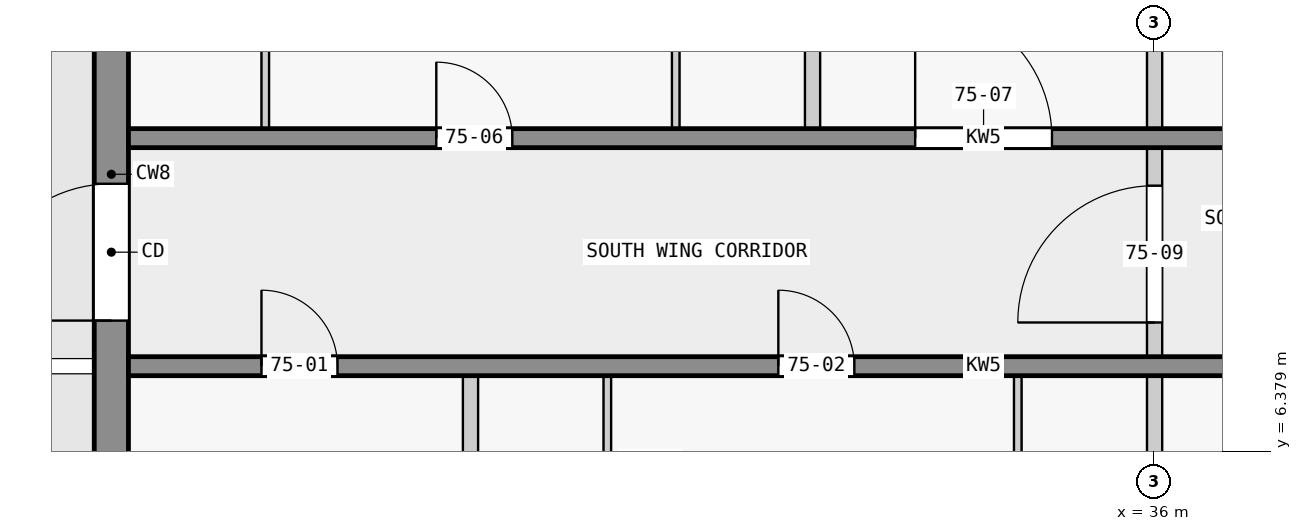
"""IFC4 building model, lengths in metres.
Left out: names, types, materials, properties, quantities, classifications, styles, units other than length and angle.
Written with IfcOpenShell. Run it as: python <this file> out.ifc"""

import sys

from ifc_helpers import new_model, si_unit, direction, frame, frame_2d, origin, place, context, subcontext, project, spatial, rectangle, extrude, element, fill, save


model = new_model("IFC4")
c1 = context("Model", 3, precision=1e-05, world=origin(), true_north=direction((0.0, 1.0)))
c2 = subcontext(c1, "Body", "Model", "MODEL_VIEW")
j1 = project(units=[si_unit("LENGTHUNIT", "METRE"), si_unit("PLANEANGLEUNIT", "RADIAN")], contexts=[c1])
p1 = place(None, origin())
s1 = spatial("IfcSite", under=j1, at=p1, CompositionType="ELEMENT")
p2 = place(p1, origin())
s2 = spatial("IfcBuilding", under=s1, at=p2, CompositionType="ELEMENT")
p3 = place(p2, frame((0.0, 0.0, 284.4)))
s3 = spatial("IfcBuildingStorey", under=s2, at=p3, CompositionType="ELEMENT", Elevation=284.4)
p4 = place(p3, frame((22.275, 2.5, 0.0), z_axis=(0.0, 0.0, 1.0), x_axis=(0.0, 1.0, 0.0)))
e1 = element("IfcWall", 1, at=p4, inside=s3, PredefinedType="SHEAR", context=c2, shape_type="SweptSolid", body=[
    extrude(rectangle(XDim=15.05, YDim=0.45, at=frame_2d((7.525, 0.0))), origin(), (0.0, 0.0, 1.0), 3.05),
])
p5 = place(p4, frame((5.6, 0.0, 0.0)))
e2 = element("IfcOpeningElement", 2, at=p5, cuts=e1, PredefinedType="OPENING", context=c2, shape_type="SweptSolid", body=[
    extrude(rectangle(XDim=1.8, YDim=2.1, at=frame_2d((0.9, 1.05))), frame((0.0, 0.235, 0.0), z_axis=(0.0, -1.0, 0.0), x_axis=(1.0, 0.0, 0.0)), (0.0, 0.0, 1.0), 0.47),
])
p6 = place(p3, frame((22.5, 7.5, 0.0), z_axis=(0.0, 0.0, 1.0), x_axis=(1.0, 0.0, 0.0)))
e3 = element("IfcWall", 3, at=p6, inside=s3, PredefinedType="SHEAR", context=c2, shape_type="SweptSolid", body=[
    extrude(rectangle(XDim=22.5, YDim=0.25, at=frame_2d((11.25, 0.0))), origin(), (0.0, 0.0, 1.0), 3.05),
])
p7 = place(p6, frame((1.75, 0.0, 0.0)))
e4 = element("IfcOpeningElement", 4, at=p7, cuts=e3, PredefinedType="OPENING", context=c2, shape_type="SweptSolid", body=[
    extrude(rectangle(XDim=1.0, YDim=2.1, at=frame_2d((0.5, 1.05))), frame((0.0, 0.135, 0.0), z_axis=(0.0, -1.0, 0.0), x_axis=(1.0, 0.0, 0.0)), (0.0, 0.0, 1.0), 0.27),
])
p8 = place(p6, frame((8.55, 0.0, 0.0)))
e5 = element("IfcOpeningElement", 5, at=p8, cuts=e3, PredefinedType="OPENING", context=c2, shape_type="SweptSolid", body=[
    extrude(rectangle(XDim=1.0, YDim=2.1, at=frame_2d((0.5, 1.05))), frame((0.0, 0.135, 0.0), z_axis=(0.0, -1.0, 0.0), x_axis=(1.0, 0.0, 0.0)), (0.0, 0.0, 1.0), 0.27),
])
p9 = place(p6, frame((15.25, 0.0, 0.0)))
e6 = element("IfcOpeningElement", 6, at=p9, cuts=e3, PredefinedType="OPENING", context=c2, shape_type="SweptSolid", body=[
    extrude(rectangle(XDim=1.0, YDim=2.1, at=frame_2d((0.5, 1.05))), frame((0.0, 0.135, 0.0), z_axis=(0.0, -1.0, 0.0), x_axis=(1.0, 0.0, 0.0)), (0.0, 0.0, 1.0), 0.27),
])
p10 = place(p6, frame((18.75, 0.0, 0.0)))
e7 = element("IfcOpeningElement", 7, at=p10, cuts=e3, PredefinedType="OPENING", context=c2, shape_type="SweptSolid", body=[
    extrude(rectangle(XDim=0.9, YDim=2.1, at=frame_2d((0.45, 1.05))), frame((0.0, 0.135, 0.0), z_axis=(0.0, -1.0, 0.0), x_axis=(1.0, 0.0, 0.0)), (0.0, 0.0, 1.0), 0.27),
])
p11 = place(p6, frame((20.95, 0.0, 0.0)))
e8 = element("IfcOpeningElement", 8, at=p11, cuts=e3, PredefinedType="OPENING", context=c2, shape_type="SweptSolid", body=[
    extrude(rectangle(XDim=1.0, YDim=2.1, at=frame_2d((0.5, 1.05))), frame((0.0, 0.135, 0.0), z_axis=(0.0, -1.0, 0.0), x_axis=(1.0, 0.0, 0.0)), (0.0, 0.0, 1.0), 0.27),
])
p12 = place(p3, frame((22.5, 10.5, 0.0), z_axis=(0.0, 0.0, 1.0), x_axis=(1.0, 0.0, 0.0)))
e9 = element("IfcWall", 9, at=p12, inside=s3, PredefinedType="SHEAR", context=c2, shape_type="SweptSolid", body=[
    extrude(rectangle(XDim=22.5, YDim=0.25, at=frame_2d((11.25, 0.0))), origin(), (0.0, 0.0, 1.0), 3.05),
])
p13 = place(p12, frame((4.05, 0.0, 0.0)))
e10 = element("IfcOpeningElement", 10, at=p13, cuts=e9, PredefinedType="OPENING", context=c2, shape_type="SweptSolid", body=[
    extrude(rectangle(XDim=1.0, YDim=2.1, at=frame_2d((0.5, 1.05))), frame((0.0, 0.135, 0.0), z_axis=(0.0, -1.0, 0.0), x_axis=(1.0, 0.0, 0.0)), (0.0, 0.0, 1.0), 0.27),
])
p14 = place(p12, frame((10.35, 0.0, 0.0)))
e11 = element("IfcOpeningElement", 11, at=p14, cuts=e9, PredefinedType="OPENING", context=c2, shape_type="SweptSolid", body=[
    extrude(rectangle(XDim=1.8, YDim=2.1, at=frame_2d((0.9, 1.05))), frame((0.0, 0.135, 0.0), z_axis=(0.0, -1.0, 0.0), x_axis=(1.0, 0.0, 0.0)), (0.0, 0.0, 1.0), 0.27),
])
p15 = place(p12, frame((16.85, 0.0, 0.0)))
e12 = element("IfcOpeningElement", 12, at=p15, cuts=e9, PredefinedType="OPENING", context=c2, shape_type="SweptSolid", body=[
    extrude(rectangle(XDim=1.0, YDim=2.1, at=frame_2d((0.5, 1.05))), frame((0.0, 0.135, 0.0), z_axis=(0.0, -1.0, 0.0), x_axis=(1.0, 0.0, 0.0)), (0.0, 0.0, 1.0), 0.27),
])
p16 = place(p3, frame((24.3, 10.625, 0.0), z_axis=(0.0, 0.0, 1.0), x_axis=(0.0, 1.0, 0.0)))
e13 = element("IfcWall", 13, at=p16, inside=s3, PredefinedType="PARTITIONING", context=c2, shape_type="SweptSolid", body=[
    extrude(rectangle(XDim=3.4, YDim=0.1, at=frame_2d((1.7, 0.0))), origin(), (0.0, 0.0, 1.0), 3.05),
])
p17 = place(p16, frame((1.25, 0.0, 0.0)))
e14 = element("IfcOpeningElement", 14, at=p17, cuts=e13, PredefinedType="OPENING", context=c2, shape_type="SweptSolid", body=[
    extrude(rectangle(XDim=0.9, YDim=2.1, at=frame_2d((0.45, 1.05))), frame((0.0, 0.06, 0.0), z_axis=(0.0, -1.0, 0.0), x_axis=(1.0, 0.0, 0.0)), (0.0, 0.0, 1.0), 0.12),
])
p18 = place(p3, frame((27.0, 1.527, 0.0), z_axis=(0.0, 0.0, 1.0), x_axis=(0.0, 1.0, 0.0)))
e15 = element("IfcWall", 15, at=p18, inside=s3, PredefinedType="PARTITIONING", context=c2, shape_type="SweptSolid", body=[
    extrude(rectangle(XDim=5.848, YDim=0.2, at=frame_2d((2.924, 0.0))), origin(), (0.0, 0.0, 1.0), 3.05),
])
p19 = place(p3, frame((28.8, 3.975, 0.0), z_axis=(0.0, 0.0, 1.0), x_axis=(0.0, 1.0, 0.0)))
e16 = element("IfcWall", 16, at=p19, inside=s3, PredefinedType="PARTITIONING", context=c2, shape_type="SweptSolid", body=[
    extrude(rectangle(XDim=3.4, YDim=0.1, at=frame_2d((1.7, 0.0))), origin(), (0.0, 0.0, 1.0), 3.05),
])
p20 = place(p19, frame((1.25, 0.0, 0.0)))
e17 = element("IfcOpeningElement", 17, at=p20, cuts=e16, PredefinedType="OPENING", context=c2, shape_type="SweptSolid", body=[
    extrude(rectangle(XDim=0.9, YDim=2.1, at=frame_2d((0.45, 1.05))), frame((0.0, 0.06, 0.0), z_axis=(0.0, -1.0, 0.0), x_axis=(1.0, 0.0, 0.0)), (0.0, 0.0, 1.0), 0.12),
])
p21 = place(p3, frame((29.7, 14.025, 0.0), z_axis=(0.0, 0.0, 1.0), x_axis=(0.0, -1.0, 0.0)))
e18 = element("IfcWall", 18, at=p21, inside=s3, PredefinedType="PARTITIONING", context=c2, shape_type="SweptSolid", body=[
    extrude(rectangle(XDim=3.4, YDim=0.1, at=frame_2d((1.7, 0.0))), origin(), (0.0, 0.0, 1.0), 3.05),
])
p22 = place(p21, frame((1.25, 0.0, 0.0)))
e19 = element("IfcOpeningElement", 19, at=p22, cuts=e18, PredefinedType="OPENING", context=c2, shape_type="SweptSolid", body=[
    extrude(rectangle(XDim=0.9, YDim=2.1, at=frame_2d((0.45, 1.05))), frame((0.0, 0.06, 0.0), z_axis=(0.0, -1.0, 0.0), x_axis=(1.0, 0.0, 0.0)), (0.0, 0.0, 1.0), 0.12),
])
p23 = place(p3, frame((31.5, 10.625, 0.0), z_axis=(0.0, 0.0, 1.0), x_axis=(0.0, 1.0, 0.0)))
e20 = element("IfcWall", 20, at=p23, inside=s3, PredefinedType="PARTITIONING", context=c2, shape_type="SweptSolid", body=[
    extrude(rectangle(XDim=3.4, YDim=0.2, at=frame_2d((1.7, 0.0))), origin(), (0.0, 0.0, 1.0), 3.05),
])
p24 = place(p3, frame((34.2, 7.375, 0.0), z_axis=(0.0, 0.0, 1.0), x_axis=(0.0, -1.0, 0.0)))
e21 = element("IfcWall", 21, at=p24, inside=s3, PredefinedType="PARTITIONING", context=c2, shape_type="SweptSolid", body=[
    extrude(rectangle(XDim=3.4, YDim=0.1, at=frame_2d((1.7, 0.0))), origin(), (0.0, 0.0, 1.0), 3.05),
])
p25 = place(p24, frame((1.25, 0.0, 0.0)))
e22 = element("IfcOpeningElement", 22, at=p25, cuts=e21, PredefinedType="OPENING", context=c2, shape_type="SweptSolid", body=[
    extrude(rectangle(XDim=0.9, YDim=2.1, at=frame_2d((0.45, 1.05))), frame((0.0, 0.06, 0.0), z_axis=(0.0, -1.0, 0.0), x_axis=(1.0, 0.0, 0.0)), (0.0, 0.0, 1.0), 0.12),
])
p26 = place(p3, frame((36.0, 3.975, 0.0), z_axis=(0.0, 0.0, 1.0), x_axis=(0.0, 1.0, 0.0)))
e23 = element("IfcWall", 23, at=p26, inside=s3, PredefinedType="PARTITIONING", context=c2, shape_type="SweptSolid", body=[
    extrude(rectangle(XDim=3.4, YDim=0.2, at=frame_2d((1.7, 0.0))), origin(), (0.0, 0.0, 1.0), 3.05),
])
p27 = place(p3, frame((36.0, 10.625, 0.0), z_axis=(0.0, 0.0, 1.0), x_axis=(0.0, 1.0, 0.0)))
e24 = element("IfcWall", 24, at=p27, inside=s3, PredefinedType="PARTITIONING", context=c2, shape_type="SweptSolid", body=[
    extrude(rectangle(XDim=5.975, YDim=0.2, at=frame_2d((2.988, 0.0))), origin(), (0.0, 0.0, 1.0), 3.05),
])
p28 = place(p3, frame((36.0, 7.475, 0.0), z_axis=(0.0, 0.0, 1.0), x_axis=(0.0, 1.0, 0.0)))
e25 = element("IfcWall", 25, at=p28, inside=s3, PredefinedType="PARTITIONING", context=c2, shape_type="SweptSolid", body=[
    extrude(rectangle(XDim=3.05, YDim=0.2, at=frame_2d((1.525, 0.0))), origin(), (0.0, 0.0, 1.0), 3.05),
])
p29 = place(p28, frame((0.6, 0.0, 0.0)))
e26 = element("IfcOpeningElement", 26, at=p29, cuts=e25, PredefinedType="OPENING", context=c2, shape_type="SweptSolid", body=[
    extrude(rectangle(XDim=1.8, YDim=2.1, at=frame_2d((0.9, 1.05))), frame((0.0, 0.11, 0.0), z_axis=(0.0, -1.0, 0.0), x_axis=(1.0, 0.0, 0.0)), (0.0, 0.0, 1.0), 0.22),
])
p30 = place(p5, origin())
e27 = element("IfcDoor", 27, at=p30, inside=s3, OperationType="DOUBLE_DOOR_SINGLE_SWING", PredefinedType="DOOR", context=c2, shape_type="SweptSolid", body=[
    extrude(rectangle(XDim=1.8, YDim=2.1, at=frame_2d((0.9, 1.05))), frame((0.0, 0.025, 0.0), z_axis=(0.0, -1.0, 0.0), x_axis=(1.0, 0.0, 0.0)), (0.0, 0.0, 1.0), 0.05),
])
fill(e2, e27)
p31 = place(p7, origin())
e28 = element("IfcDoor", 28, at=p31, inside=s3, OperationType="SINGLE_SWING_LEFT", PredefinedType="DOOR", context=c2, shape_type="SweptSolid", body=[
    extrude(rectangle(XDim=1.0, YDim=2.1, at=frame_2d((0.5, 1.05))), frame((0.0, 0.025, 0.0), z_axis=(0.0, -1.0, 0.0), x_axis=(1.0, 0.0, 0.0)), (0.0, 0.0, 1.0), 0.05),
])
fill(e4, e28)
p32 = place(p8, origin())
e29 = element("IfcDoor", 29, at=p32, inside=s3, OperationType="SINGLE_SWING_LEFT", PredefinedType="DOOR", context=c2, shape_type="SweptSolid", body=[
    extrude(rectangle(XDim=1.0, YDim=2.1, at=frame_2d((0.5, 1.05))), frame((0.0, 0.025, 0.0), z_axis=(0.0, -1.0, 0.0), x_axis=(1.0, 0.0, 0.0)), (0.0, 0.0, 1.0), 0.05),
])
fill(e5, e29)
p33 = place(p13, origin())
e30 = element("IfcDoor", 30, at=p33, inside=s3, OperationType="SINGLE_SWING_LEFT", PredefinedType="DOOR", context=c2, shape_type="SweptSolid", body=[
    extrude(rectangle(XDim=1.0, YDim=2.1, at=frame_2d((0.5, 1.05))), frame((0.0, 0.025, 0.0), z_axis=(0.0, -1.0, 0.0), x_axis=(1.0, 0.0, 0.0)), (0.0, 0.0, 1.0), 0.05),
])
fill(e10, e30)
p34 = place(p14, origin())
e31 = element("IfcDoor", 31, at=p34, inside=s3, OperationType="SINGLE_SWING_LEFT", PredefinedType="DOOR", context=c2, shape_type="SweptSolid", body=[
    extrude(rectangle(XDim=1.8, YDim=2.1, at=frame_2d((0.9, 1.05))), frame((0.0, 0.025, 0.0), z_axis=(0.0, -1.0, 0.0), x_axis=(1.0, 0.0, 0.0)), (0.0, 0.0, 1.0), 0.05),
])
fill(e11, e31)
p35 = place(p29, origin())
e32 = element("IfcDoor", 32, at=p35, inside=s3, OperationType="SINGLE_SWING_LEFT", PredefinedType="DOOR", context=c2, shape_type="SweptSolid", body=[
    extrude(rectangle(XDim=1.8, YDim=2.1, at=frame_2d((0.9, 1.05))), frame((0.0, 0.025, 0.0), z_axis=(0.0, -1.0, 0.0), x_axis=(1.0, 0.0, 0.0)), (0.0, 0.0, 1.0), 0.05),
])
fill(e26, e32)
save(model, sys.argv[1])
